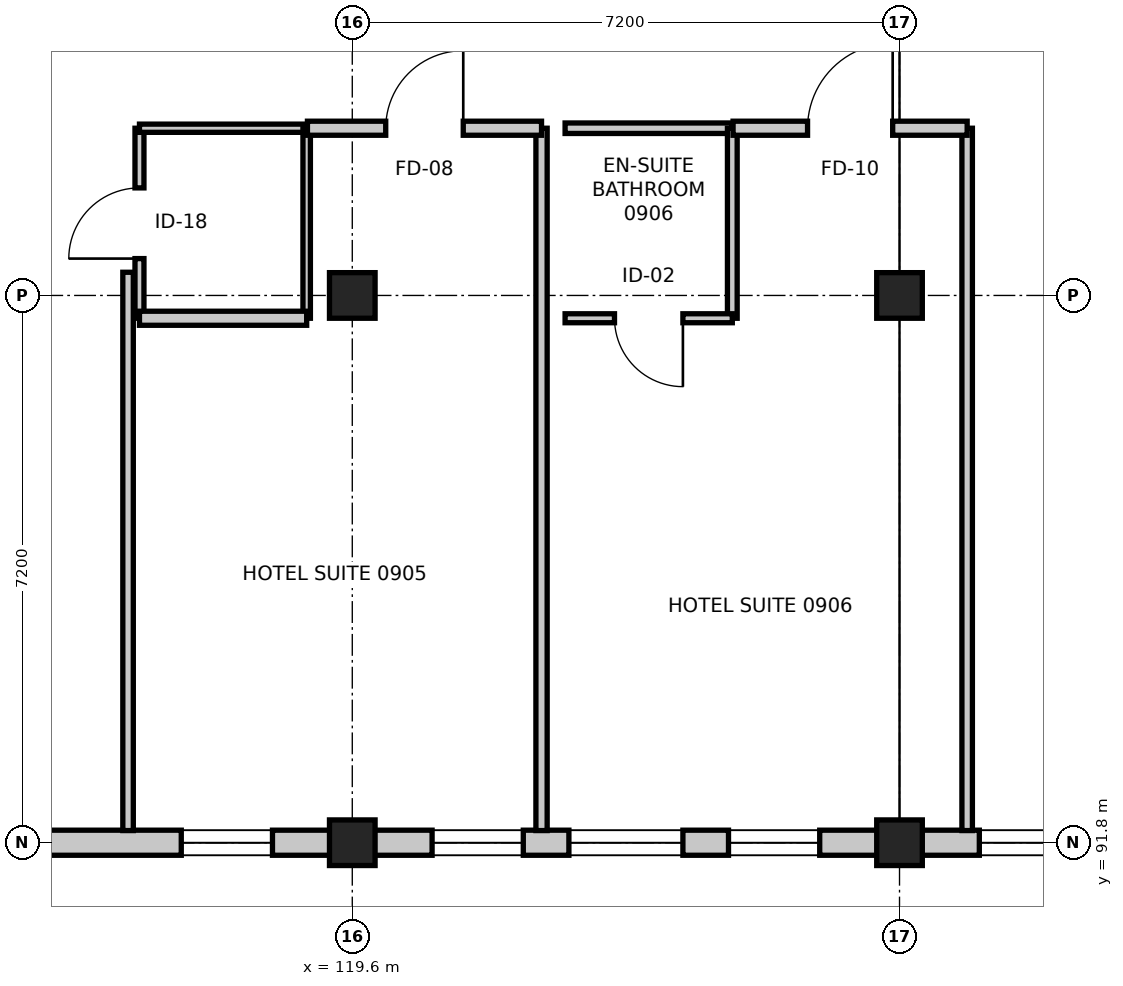
"""IFC4 building model, lengths in metres.
Left out: names, types, materials, properties, quantities, classifications, styles, units other than length and angle.
Written with IfcOpenShell. Run it as: python <this file> out.ifc"""

import sys

from ifc_helpers import new_model, si_unit, direction, frame, frame_2d, origin, origin_2d, place, context, subcontext, project, spatial, rectangle, extrude, element, fill, save


model = new_model("IFC4")
c1 = context("Model", 3, precision=1e-05, world=origin(), true_north=direction((0.0, 1.0)))
c2 = subcontext(c1, "Body", "Model", "MODEL_VIEW")
j1 = project(units=[si_unit("LENGTHUNIT", "METRE"), si_unit("PLANEANGLEUNIT", "RADIAN")], contexts=[c1])
p1 = place(None, origin())
s1 = spatial("IfcSite", under=j1, at=p1, CompositionType="ELEMENT")
p2 = place(p1, origin())
s2 = spatial("IfcBuilding", under=s1, at=p2, CompositionType="ELEMENT")
p3 = place(p2, frame((0.0, 0.0, 37.2)))
s3 = spatial("IfcBuildingStorey", under=s2, at=p3, CompositionType="ELEMENT", Elevation=37.2)
for number, where, z_axis, x_axis in (
    (1, (119.6, 91.8, 0.0), (0.0, 0.0, 1.0), (1.0, 0.0, 0.0)),
    (2, (119.6, 99.0, 0.0), (0.0, 0.0, 1.0), (1.0, 0.0, 0.0)),
    (3, (126.8, 91.8, 0.0), (0.0, 0.0, 1.0), (1.0, 0.0, 0.0)),
    (4, (126.8, 99.0, 0.0), (0.0, 0.0, 1.0), (1.0, 0.0, 0.0)),
):
    element("IfcColumn", number, at=place(p3, frame(where, z_axis=z_axis, x_axis=x_axis)), inside=s3, PredefinedType="COLUMN", context=c2, shape_type="SweptSolid", body=[
        extrude(rectangle(XDim=0.6, YDim=0.6, at=origin_2d()), origin(), (0.0, 0.0, 1.0), 3.6),
    ])
p4 = place(p3, frame((134.0, 91.8, 0.0), z_axis=(0.0, 0.0, 1.0), x_axis=(-1.0, 0.0, 0.0)))
e5 = element("IfcWall", 5, at=p4, inside=s3, PredefinedType="STANDARD", context=c2, shape_type="SweptSolid", body=[
    extrude(rectangle(XDim=7.2, YDim=0.33, at=frame_2d((3.6, 0.0))), origin(), (0.0, 0.0, 1.0), 2.86),
])
p5 = place(p4, frame((3.0, 0.0, 0.75)))
e6 = element("IfcOpeningElement", 6, at=p5, cuts=e5, PredefinedType="OPENING", context=c2, shape_type="SweptSolid", body=[
    extrude(rectangle(XDim=1.2, YDim=1.8, at=frame_2d((0.6, 0.9))), frame((0.0, 0.175, 0.0), z_axis=(0.0, -1.0, 0.0), x_axis=(1.0, 0.0, 0.0)), (0.0, 0.0, 1.0), 0.35),
])
p6 = place(p4, frame((1.05, 0.0, 0.85)))
e7 = element("IfcOpeningElement", 7, at=p6, cuts=e5, PredefinedType="OPENING", context=c2, shape_type="SweptSolid", body=[
    extrude(rectangle(XDim=1.2, YDim=1.8, at=frame_2d((0.6, 0.9))), frame((0.0, 0.175, 0.0), z_axis=(0.0, -1.0, 0.0), x_axis=(1.0, 0.0, 0.0)), (0.0, 0.0, 1.0), 0.35),
])
p7 = place(p4, frame((4.95, 0.0, 0.85)))
e8 = element("IfcOpeningElement", 8, at=p7, cuts=e5, PredefinedType="OPENING", context=c2, shape_type="SweptSolid", body=[
    extrude(rectangle(XDim=1.2, YDim=1.8, at=frame_2d((0.6, 0.9))), frame((0.0, 0.175, 0.0), z_axis=(0.0, -1.0, 0.0), x_axis=(1.0, 0.0, 0.0)), (0.0, 0.0, 1.0), 0.35),
])
p8 = place(p3, frame((126.8, 91.8, 0.0), z_axis=(0.0, 0.0, 1.0), x_axis=(-1.0, 0.0, 0.0)))
e9 = element("IfcWall", 9, at=p8, inside=s3, PredefinedType="STANDARD", context=c2, shape_type="SweptSolid", body=[
    extrude(rectangle(XDim=7.2, YDim=0.33, at=frame_2d((3.6, 0.0))), origin(), (0.0, 0.0, 1.0), 2.765),
])
p9 = place(p8, frame((2.85, 0.0, 0.75)))
e10 = element("IfcOpeningElement", 10, at=p9, cuts=e9, PredefinedType="OPENING", context=c2, shape_type="SweptSolid", body=[
    extrude(rectangle(XDim=1.5, YDim=1.5, at=frame_2d((0.75, 0.75))), frame((0.0, 0.175, 0.0), z_axis=(0.0, -1.0, 0.0), x_axis=(1.0, 0.0, 0.0)), (0.0, 0.0, 1.0), 0.35),
])
p10 = place(p8, frame((1.05, 0.0, 0.85)))
e11 = element("IfcOpeningElement", 11, at=p10, cuts=e9, PredefinedType="OPENING", context=c2, shape_type="SweptSolid", body=[
    extrude(rectangle(XDim=1.2, YDim=1.8, at=frame_2d((0.6, 0.9))), frame((0.0, 0.175, 0.0), z_axis=(0.0, -1.0, 0.0), x_axis=(1.0, 0.0, 0.0)), (0.0, 0.0, 1.0), 0.35),
])
p11 = place(p8, frame((4.95, 0.0, 0.85)))
e12 = element("IfcOpeningElement", 12, at=p11, cuts=e9, PredefinedType="OPENING", context=c2, shape_type="SweptSolid", body=[
    extrude(rectangle(XDim=1.2, YDim=1.8, at=frame_2d((0.6, 0.9))), frame((0.0, 0.175, 0.0), z_axis=(0.0, -1.0, 0.0), x_axis=(1.0, 0.0, 0.0)), (0.0, 0.0, 1.0), 0.35),
])
p12 = place(p3, frame((119.6, 91.8, 0.0), z_axis=(0.0, 0.0, 1.0), x_axis=(-1.0, 0.0, 0.0)))
e13 = element("IfcWall", 13, at=p12, inside=s3, PredefinedType="STANDARD", context=c2, shape_type="SweptSolid", body=[
    extrude(rectangle(XDim=7.2, YDim=0.33, at=frame_2d((3.6, 0.0))), origin(), (0.0, 0.0, 1.0), 2.765),
])
p13 = place(p12, frame((1.05, 0.0, 0.85)))
e14 = element("IfcOpeningElement", 14, at=p13, cuts=e13, PredefinedType="OPENING", context=c2, shape_type="SweptSolid", body=[
    extrude(rectangle(XDim=1.2, YDim=1.8, at=frame_2d((0.6, 0.9))), frame((0.0, 0.175, 0.0), z_axis=(0.0, -1.0, 0.0), x_axis=(1.0, 0.0, 0.0)), (0.0, 0.0, 1.0), 0.35),
])
p14 = place(p12, frame((4.95, 0.0, 0.85)))
e15 = element("IfcOpeningElement", 15, at=p14, cuts=e13, PredefinedType="OPENING", context=c2, shape_type="SweptSolid", body=[
    extrude(rectangle(XDim=1.2, YDim=1.8, at=frame_2d((0.6, 0.9))), frame((0.0, 0.175, 0.0), z_axis=(0.0, -1.0, 0.0), x_axis=(1.0, 0.0, 0.0)), (0.0, 0.0, 1.0), 0.35),
])
p15 = place(p3, frame((116.8, 98.7, 0.0), z_axis=(0.0, 0.0, 1.0), x_axis=(0.0, 1.0, 0.0)))
e16 = element("IfcWall", 16, at=p15, inside=s3, PredefinedType="PARTITIONING", context=c2, shape_type="SweptSolid", body=[
    extrude(rectangle(XDim=2.5, YDim=0.118, at=frame_2d((1.25, 0.0))), origin(), (0.0, 0.0, 1.0), 2.765),
])
p16 = place(p15, frame((0.785, 0.0, 0.0)))
e17 = element("IfcOpeningElement", 17, at=p16, cuts=e16, PredefinedType="OPENING", context=c2, shape_type="SweptSolid", body=[
    extrude(rectangle(XDim=0.93, YDim=2.13, at=frame_2d((0.465, 1.065))), frame((0.0, 0.069, 0.0), z_axis=(0.0, -1.0, 0.0), x_axis=(1.0, 0.0, 0.0)), (0.0, 0.0, 1.0), 0.138),
])
p17 = place(p3, frame((116.8, 101.2, 0.0), z_axis=(0.0, 0.0, 1.0), x_axis=(1.0, 0.0, 0.0)))
e18 = element("IfcWall", 18, at=p17, inside=s3, PredefinedType="PARTITIONING", context=c2, shape_type="SweptSolid", body=[
    extrude(rectangle(XDim=2.2, YDim=0.108, at=frame_2d((1.1, 0.0))), origin(), (0.0, 0.0, 1.0), 3.38),
])
p18 = place(p3, frame((119.0, 101.2, 0.0), z_axis=(0.0, 0.0, 1.0), x_axis=(0.0, -1.0, 0.0)))
e19 = element("IfcWall", 19, at=p18, inside=s3, PredefinedType="PARTITIONING", context=c2, shape_type="SweptSolid", body=[
    extrude(rectangle(XDim=2.5, YDim=0.098, at=frame_2d((1.25, 0.0))), origin(), (0.0, 0.0, 1.0), 2.765),
])
p19 = place(p3, frame((119.0, 98.7, 0.0), z_axis=(0.0, 0.0, 1.0), x_axis=(-1.0, 0.0, 0.0)))
e20 = element("IfcWall", 20, at=p19, inside=s3, PredefinedType="PARTITIONING", context=c2, shape_type="SweptSolid", body=[
    extrude(rectangle(XDim=2.2, YDim=0.185, at=frame_2d((1.1, 0.0))), origin(), (0.0, 0.0, 1.0), 2.765),
])
p20 = place(p3, frame((122.09, 101.2, 0.0), z_axis=(0.0, 0.0, 1.0), x_axis=(0.0, -1.0, 0.0)))
e21 = element("IfcWall", 21, at=p20, inside=s3, PredefinedType="PARTITIONING", context=c2, shape_type="SweptSolid", body=[
    extrude(rectangle(XDim=9.24, YDim=0.148, at=frame_2d((4.62, 0.0))), origin(), (0.0, 0.0, 1.0), 2.765),
])
p21 = place(p3, frame((116.65, 91.96, 0.0), z_axis=(0.0, 0.0, 1.0), x_axis=(0.0, 1.0, 0.0)))
e22 = element("IfcWall", 22, at=p21, inside=s3, PredefinedType="PARTITIONING", context=c2, shape_type="SweptSolid", body=[
    extrude(rectangle(XDim=7.345, YDim=0.138, at=frame_2d((3.672, 0.0))), origin(), (0.0, 0.0, 1.0), 2.765),
])
p22 = place(p3, frame((119.01, 101.2, 0.0), z_axis=(0.0, 0.0, 1.0), x_axis=(1.0, 0.0, 0.0)))
e23 = element("IfcWall", 23, at=p22, inside=s3, PredefinedType="PARTITIONING", context=c2, shape_type="SweptSolid", body=[
    extrude(rectangle(XDim=3.08, YDim=0.185, at=frame_2d((1.54, 0.0))), origin(), (0.0, 0.0, 1.0), 2.715),
])
p23 = place(p22, frame((1.03, 0.0, 0.0)))
e24 = element("IfcOpeningElement", 24, at=p23, cuts=e23, PredefinedType="OPENING", context=c2, shape_type="SweptSolid", body=[
    extrude(rectangle(XDim=1.02, YDim=2.15, at=frame_2d((0.51, 1.075))), frame((0.0, 0.103, 0.0), z_axis=(0.0, -1.0, 0.0), x_axis=(1.0, 0.0, 0.0)), (0.0, 0.0, 1.0), 0.205),
])
p24 = place(p3, frame((122.4, 101.2, 0.0), z_axis=(0.0, 0.0, 1.0), x_axis=(1.0, 0.0, 0.0)))
e25 = element("IfcWall", 25, at=p24, inside=s3, PredefinedType="PARTITIONING", context=c2, shape_type="SweptSolid", body=[
    extrude(rectangle(XDim=2.2, YDim=0.138, at=frame_2d((1.1, 0.0))), origin(), (0.0, 0.0, 1.0), 3.38),
])
p25 = place(p3, frame((124.6, 101.2, 0.0), z_axis=(0.0, 0.0, 1.0), x_axis=(0.0, -1.0, 0.0)))
e26 = element("IfcWall", 26, at=p25, inside=s3, PredefinedType="PARTITIONING", context=c2, shape_type="SweptSolid", body=[
    extrude(rectangle(XDim=2.5, YDim=0.128, at=frame_2d((1.25, 0.0))), origin(), (0.0, 0.0, 1.0), 2.765),
])
p26 = place(p3, frame((124.6, 98.7, 0.0), z_axis=(0.0, 0.0, 1.0), x_axis=(-1.0, 0.0, 0.0)))
e27 = element("IfcWall", 27, at=p26, inside=s3, PredefinedType="PARTITIONING", context=c2, shape_type="SweptSolid", body=[
    extrude(rectangle(XDim=2.2, YDim=0.118, at=frame_2d((1.1, 0.0))), origin(), (0.0, 0.0, 1.0), 3.38),
])
p27 = place(p26, frame((0.65, 0.0, 0.0)))
e28 = element("IfcOpeningElement", 28, at=p27, cuts=e27, PredefinedType="OPENING", context=c2, shape_type="SweptSolid", body=[
    extrude(rectangle(XDim=0.9, YDim=2.08, at=frame_2d((0.45, 1.04))), frame((0.0, 0.069, 0.0), z_axis=(0.0, -1.0, 0.0), x_axis=(1.0, 0.0, 0.0)), (0.0, 0.0, 1.0), 0.138),
])
p28 = place(p3, frame((127.69, 101.2, 0.0), z_axis=(0.0, 0.0, 1.0), x_axis=(0.0, -1.0, 0.0)))
e29 = element("IfcWall", 29, at=p28, inside=s3, PredefinedType="PARTITIONING", context=c2, shape_type="SweptSolid", body=[
    extrude(rectangle(XDim=9.24, YDim=0.138, at=frame_2d((4.62, 0.0))), origin(), (0.0, 0.0, 1.0), 3.38),
])
p29 = place(p3, frame((124.61, 101.2, 0.0), z_axis=(0.0, 0.0, 1.0), x_axis=(1.0, 0.0, 0.0)))
e30 = element("IfcWall", 30, at=p29, inside=s3, PredefinedType="PARTITIONING", context=c2, shape_type="SweptSolid", body=[
    extrude(rectangle(XDim=3.08, YDim=0.185, at=frame_2d((1.54, 0.0))), origin(), (0.0, 0.0, 1.0), 2.715),
])
p30 = place(p29, frame((0.98, 0.0, 0.0)))
e31 = element("IfcOpeningElement", 31, at=p30, cuts=e30, PredefinedType="OPENING", context=c2, shape_type="SweptSolid", body=[
    extrude(rectangle(XDim=1.12, YDim=2.2, at=frame_2d((0.56, 1.1))), frame((0.0, 0.103, 0.0), z_axis=(0.0, -1.0, 0.0), x_axis=(1.0, 0.0, 0.0)), (0.0, 0.0, 1.0), 0.205),
])
p31 = place(p7, origin())
e32 = element("IfcWindow", 32, at=p31, inside=s3, PartitioningType="SINGLE_PANEL", PredefinedType="WINDOW", context=c2, shape_type="SweptSolid", body=[
    extrude(rectangle(XDim=1.2, YDim=1.8, at=frame_2d((0.6, 0.9))), frame((0.0, 0.03, 0.0), z_axis=(0.0, -1.0, 0.0), x_axis=(1.0, 0.0, 0.0)), (0.0, 0.0, 1.0), 0.06),
])
fill(e8, e32)
p32 = place(p9, origin())
e33 = element("IfcWindow", 33, at=p32, inside=s3, PartitioningType="SINGLE_PANEL", PredefinedType="WINDOW", context=c2, shape_type="SweptSolid", body=[
    extrude(rectangle(XDim=1.5, YDim=1.5, at=frame_2d((0.75, 0.75))), frame((0.0, 0.03, 0.0), z_axis=(0.0, -1.0, 0.0), x_axis=(1.0, 0.0, 0.0)), (0.0, 0.0, 1.0), 0.06),
])
fill(e10, e33)
p33 = place(p10, origin())
e34 = element("IfcWindow", 34, at=p33, inside=s3, PartitioningType="SINGLE_PANEL", PredefinedType="WINDOW", context=c2, shape_type="SweptSolid", body=[
    extrude(rectangle(XDim=1.2, YDim=1.8, at=frame_2d((0.6, 0.9))), frame((0.0, 0.03, 0.0), z_axis=(0.0, -1.0, 0.0), x_axis=(1.0, 0.0, 0.0)), (0.0, 0.0, 1.0), 0.06),
])
fill(e11, e34)
p34 = place(p11, origin())
e35 = element("IfcWindow", 35, at=p34, inside=s3, PartitioningType="SINGLE_PANEL", PredefinedType="WINDOW", context=c2, shape_type="SweptSolid", body=[
    extrude(rectangle(XDim=1.2, YDim=1.8, at=frame_2d((0.6, 0.9))), frame((0.0, 0.03, 0.0), z_axis=(0.0, -1.0, 0.0), x_axis=(1.0, 0.0, 0.0)), (0.0, 0.0, 1.0), 0.06),
])
fill(e12, e35)
p35 = place(p13, origin())
e36 = element("IfcWindow", 36, at=p35, inside=s3, PartitioningType="SINGLE_PANEL", PredefinedType="WINDOW", context=c2, shape_type="SweptSolid", body=[
    extrude(rectangle(XDim=1.2, YDim=1.8, at=frame_2d((0.6, 0.9))), frame((0.0, 0.03, 0.0), z_axis=(0.0, -1.0, 0.0), x_axis=(1.0, 0.0, 0.0)), (0.0, 0.0, 1.0), 0.06),
])
fill(e14, e36)
p36 = place(p16, origin())
e37 = element("IfcDoor", 37, at=p36, inside=s3, OperationType="SINGLE_SWING_LEFT", PredefinedType="DOOR", context=c2, shape_type="SweptSolid", body=[
    extrude(rectangle(XDim=0.93, YDim=2.13, at=frame_2d((0.465, 1.065))), frame((0.0, 0.025, 0.0), z_axis=(0.0, -1.0, 0.0), x_axis=(1.0, 0.0, 0.0)), (0.0, 0.0, 1.0), 0.05),
])
fill(e17, e37)
p37 = place(p23, origin())
e38 = element("IfcDoor", 38, at=p37, inside=s3, OperationType="SINGLE_SWING_RIGHT", PredefinedType="DOOR", context=c2, shape_type="SweptSolid", body=[
    extrude(rectangle(XDim=1.02, YDim=2.15, at=frame_2d((0.51, 1.075))), frame((0.0, 0.025, 0.0), z_axis=(0.0, -1.0, 0.0), x_axis=(1.0, 0.0, 0.0)), (0.0, 0.0, 1.0), 0.05),
])
fill(e24, e38)
p38 = place(p27, origin())
e39 = element("IfcDoor", 39, at=p38, inside=s3, OperationType="SINGLE_SWING_LEFT", PredefinedType="DOOR", context=c2, shape_type="SweptSolid", body=[
    extrude(rectangle(XDim=0.9, YDim=2.08, at=frame_2d((0.45, 1.04))), frame((0.0, 0.025, 0.0), z_axis=(0.0, -1.0, 0.0), x_axis=(1.0, 0.0, 0.0)), (0.0, 0.0, 1.0), 0.05),
])
fill(e28, e39)
p39 = place(p30, origin())
e40 = element("IfcDoor", 40, at=p39, inside=s3, OperationType="SINGLE_SWING_RIGHT", PredefinedType="DOOR", context=c2, shape_type="SweptSolid", body=[
    extrude(rectangle(XDim=1.12, YDim=2.2, at=frame_2d((0.56, 1.1))), frame((0.0, 0.025, 0.0), z_axis=(0.0, -1.0, 0.0), x_axis=(1.0, 0.0, 0.0)), (0.0, 0.0, 1.0), 0.05),
])
fill(e31, e40)
save(model, sys.argv[1])
